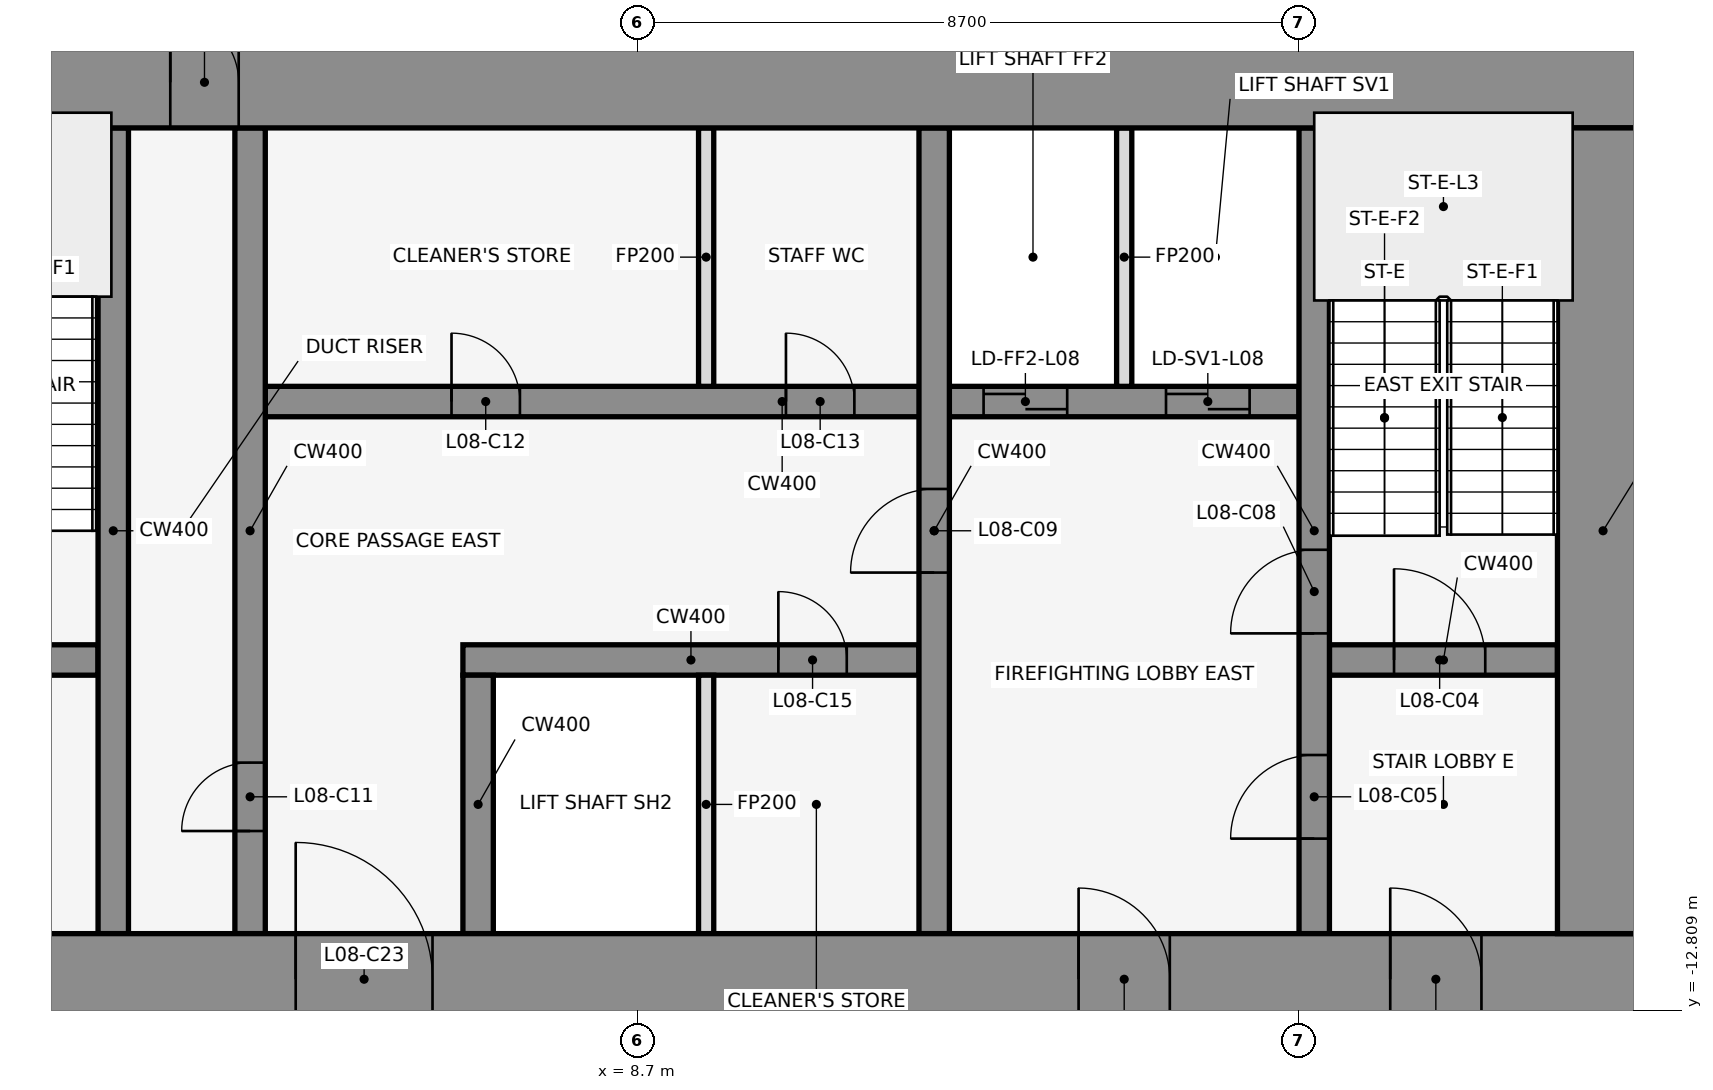
"""IFC4 building model, lengths in metres.
Left out: names, types, materials, properties, quantities, classifications, styles, units other than length and angle.
Written with IfcOpenShell. Run it as: python <this file> out.ifc"""

import sys

from ifc_helpers import new_model, si_unit, direction, frame, frame_2d, origin, place, context, subcontext, project, spatial, rectangle, extrude, element, fill, save


model = new_model("IFC4")
c1 = context("Model", 3, precision=1e-05, world=origin(), true_north=direction((0.0, 1.0)))
c2 = subcontext(c1, "Body", "Model", "MODEL_VIEW")
j1 = project(units=[si_unit("LENGTHUNIT", "METRE"), si_unit("PLANEANGLEUNIT", "RADIAN")], contexts=[c1])
p1 = place(None, origin())
s1 = spatial("IfcSite", under=j1, at=p1, CompositionType="ELEMENT")
p2 = place(p1, origin())
s2 = spatial("IfcBuilding", under=s1, at=p2, CompositionType="ELEMENT")
p3 = place(p2, frame((0.0, 0.0, 44.0)))
s3 = spatial("IfcBuildingStorey", under=s2, at=p3, CompositionType="ELEMENT", Elevation=44.0)
for number, where, z_axis, x_axis in (
    (1, (16.432, -0.105, 0.0), (0.0, 0.0, 1.0), (-0.84, 0.543, 0.0)),
    (2, (1.901, 1.08, 0.0), (0.0, 0.0, 1.0), (-0.84, -0.543, 0.0)),
):
    element("IfcWall", number, at=place(p3, frame(where, z_axis=z_axis, x_axis=x_axis)), inside=s3, PredefinedType="STANDARD", context=c2, shape_type="SweptSolid", body=[
        extrude(rectangle(XDim=2.183, YDim=0.25, at=frame_2d((1.091, 0.0))), origin(), (0.0, 0.0, 1.0), 4.35),
    ])
p4 = place(p3, frame((-1.6, -8.2, 0.0), z_axis=(0.0, 0.0, 1.0), x_axis=(1.0, 0.0, 0.0)))
e3 = element("IfcWall", 3, at=p4, inside=s3, PredefinedType="SHEAR", context=c2, shape_type="SweptSolid", body=[
    extrude(rectangle(XDim=3.2, YDim=0.4, at=frame_2d((1.6, 0.0))), origin(), (0.0, 0.0, 1.0), 4.5),
])
p5 = place(p4, frame((1.05, 0.0, 0.0)))
e4 = element("IfcOpeningElement", 4, at=p5, cuts=e3, PredefinedType="OPENING", context=c2, shape_type="SweptSolid", body=[
    extrude(rectangle(XDim=1.2, YDim=2.1, at=frame_2d((0.6, 1.05))), frame((0.0, 0.212, 0.0), z_axis=(0.0, -1.0, 0.0), x_axis=(1.0, 0.0, 0.0)), (0.0, 0.0, 1.0), 0.424),
])
p6 = place(p3, frame((6.4, -8.2, 0.0), z_axis=(0.0, 0.0, 1.0), x_axis=(1.0, 0.0, 0.0)))
e5 = element("IfcWall", 5, at=p6, inside=s3, PredefinedType="SHEAR", context=c2, shape_type="SweptSolid", body=[
    extrude(rectangle(XDim=6.0, YDim=0.4, at=frame_2d((3.0, 0.0))), origin(), (0.0, 0.0, 1.0), 4.5),
])
p7 = place(p6, frame((4.15, 0.0, 0.0)))
e6 = element("IfcOpeningElement", 6, at=p7, cuts=e5, PredefinedType="OPENING", context=c2, shape_type="SweptSolid", body=[
    extrude(rectangle(XDim=0.9, YDim=2.1, at=frame_2d((0.45, 1.05))), frame((0.0, 0.212, 0.0), z_axis=(0.0, -1.0, 0.0), x_axis=(1.0, 0.0, 0.0)), (0.0, 0.0, 1.0), 0.424),
])
p8 = place(p3, frame((17.8, -8.2, 0.0), z_axis=(0.0, 0.0, 1.0), x_axis=(1.0, 0.0, 0.0)))
e7 = element("IfcWall", 7, at=p8, inside=s3, PredefinedType="SHEAR", context=c2, shape_type="SweptSolid", body=[
    extrude(rectangle(XDim=3.0, YDim=0.4, at=frame_2d((1.5, 0.0))), origin(), (0.0, 0.0, 1.0), 4.5),
])
p9 = place(p8, frame((0.85, 0.0, 0.0)))
e8 = element("IfcOpeningElement", 8, at=p9, cuts=e7, PredefinedType="OPENING", context=c2, shape_type="SweptSolid", body=[
    extrude(rectangle(XDim=1.2, YDim=2.1, at=frame_2d((0.6, 1.05))), frame((0.0, 0.212, 0.0), z_axis=(0.0, -1.0, 0.0), x_axis=(1.0, 0.0, 0.0)), (0.0, 0.0, 1.0), 0.424),
])
p10 = place(p3, frame((3.8, -4.8, 0.0), z_axis=(0.0, 0.0, 1.0), x_axis=(1.0, 0.0, 0.0)))
e9 = element("IfcWall", 9, at=p10, inside=s3, PredefinedType="SHEAR", context=c2, shape_type="SweptSolid", body=[
    extrude(rectangle(XDim=13.6, YDim=0.4, at=frame_2d((6.8, 0.0))), origin(), (0.0, 0.0, 1.0), 4.5),
])
p11 = place(p10, frame((9.45, 0.0, 0.0)))
e10 = element("IfcOpeningElement", 10, at=p11, cuts=e9, PredefinedType="OPENING", context=c2, shape_type="SweptSolid", body=[
    extrude(rectangle(XDim=1.1, YDim=2.1, at=frame_2d((0.55, 1.05))), frame((0.0, 0.212, 0.0), z_axis=(0.0, -1.0, 0.0), x_axis=(1.0, 0.0, 0.0)), (0.0, 0.0, 1.0), 0.424),
])
p12 = place(p10, frame((11.85, 0.0, 0.0)))
e11 = element("IfcOpeningElement", 11, at=p12, cuts=e9, PredefinedType="OPENING", context=c2, shape_type="SweptSolid", body=[
    extrude(rectangle(XDim=1.1, YDim=2.1, at=frame_2d((0.55, 1.05))), frame((0.0, 0.212, 0.0), z_axis=(0.0, -1.0, 0.0), x_axis=(1.0, 0.0, 0.0)), (0.0, 0.0, 1.0), 0.424),
])
p13 = place(p10, frame((2.45, 0.0, 0.0)))
e12 = element("IfcOpeningElement", 12, at=p13, cuts=e9, PredefinedType="OPENING", context=c2, shape_type="SweptSolid", body=[
    extrude(rectangle(XDim=0.9, YDim=2.1, at=frame_2d((0.45, 1.05))), frame((0.0, 0.212, 0.0), z_axis=(0.0, -1.0, 0.0), x_axis=(1.0, 0.0, 0.0)), (0.0, 0.0, 1.0), 0.424),
])
p14 = place(p10, frame((6.85, 0.0, 0.0)))
e13 = element("IfcOpeningElement", 13, at=p14, cuts=e9, PredefinedType="OPENING", context=c2, shape_type="SweptSolid", body=[
    extrude(rectangle(XDim=0.9, YDim=2.1, at=frame_2d((0.45, 1.05))), frame((0.0, 0.212, 0.0), z_axis=(0.0, -1.0, 0.0), x_axis=(1.0, 0.0, 0.0)), (0.0, 0.0, 1.0), 0.424),
])
p15 = place(p3, frame((1.8, -11.8, 0.0), z_axis=(0.0, 0.0, 1.0), x_axis=(0.0, 1.0, 0.0)))
e14 = element("IfcWall", 14, at=p15, inside=s3, PredefinedType="SHEAR", context=c2, shape_type="SweptSolid", body=[
    extrude(rectangle(XDim=10.6, YDim=0.4, at=frame_2d((5.3, 0.0))), origin(), (0.0, 0.0, 1.0), 4.5),
])
p16 = place(p3, frame((3.6, -11.8, 0.0), z_axis=(0.0, 0.0, 1.0), x_axis=(0.0, 1.0, 0.0)))
e15 = element("IfcWall", 15, at=p16, inside=s3, PredefinedType="SHEAR", context=c2, shape_type="SweptSolid", body=[
    extrude(rectangle(XDim=10.6, YDim=0.4, at=frame_2d((5.3, 0.0))), origin(), (0.0, 0.0, 1.0), 4.5),
])
p17 = place(p16, frame((1.35, 0.0, 0.0)))
e16 = element("IfcOpeningElement", 16, at=p17, cuts=e15, PredefinedType="OPENING", context=c2, shape_type="SweptSolid", body=[
    extrude(rectangle(XDim=0.9, YDim=2.1, at=frame_2d((0.45, 1.05))), frame((0.0, 0.212, 0.0), z_axis=(0.0, -1.0, 0.0), x_axis=(1.0, 0.0, 0.0)), (0.0, 0.0, 1.0), 0.424),
])
p18 = place(p3, frame((6.6, -11.8, 0.0), z_axis=(0.0, 0.0, 1.0), x_axis=(0.0, 1.0, 0.0)))
e17 = element("IfcWall", 17, at=p18, inside=s3, PredefinedType="SHEAR", context=c2, shape_type="SweptSolid", body=[
    extrude(rectangle(XDim=3.4, YDim=0.4, at=frame_2d((1.7, 0.0))), origin(), (0.0, 0.0, 1.0), 4.5),
])
for number, where, z_axis, x_axis in (
    (18, (9.6, -11.8, 0.0), (0.0, 0.0, 1.0), (0.0, 1.0, 0.0)),
    (19, (9.6, -4.6, 0.0), (0.0, 0.0, 1.0), (0.0, 1.0, 0.0)),
):
    element("IfcWall", number, at=place(p3, frame(where, z_axis=z_axis, x_axis=x_axis)), inside=s3, PredefinedType="PARTITIONING", context=c2, shape_type="SweptSolid", body=[
        extrude(rectangle(XDim=3.4, YDim=0.2, at=frame_2d((1.7, 0.0))), origin(), (0.0, 0.0, 1.0), 3.418),
    ])
p19 = place(p3, frame((12.6, -11.8, 0.0), z_axis=(0.0, 0.0, 1.0), x_axis=(0.0, 1.0, 0.0)))
e20 = element("IfcWall", 20, at=p19, inside=s3, PredefinedType="SHEAR", context=c2, shape_type="SweptSolid", body=[
    extrude(rectangle(XDim=10.6, YDim=0.4, at=frame_2d((5.3, 0.0))), origin(), (0.0, 0.0, 1.0), 4.5),
])
p20 = place(p19, frame((4.75, 0.0, 0.0)))
e21 = element("IfcOpeningElement", 21, at=p20, cuts=e20, PredefinedType="OPENING", context=c2, shape_type="SweptSolid", body=[
    extrude(rectangle(XDim=1.1, YDim=2.1, at=frame_2d((0.55, 1.05))), frame((0.0, 0.212, 0.0), z_axis=(0.0, -1.0, 0.0), x_axis=(1.0, 0.0, 0.0)), (0.0, 0.0, 1.0), 0.424),
])
p21 = place(p3, frame((15.1, -4.6, 0.0), z_axis=(0.0, 0.0, 1.0), x_axis=(0.0, 1.0, 0.0)))
e22 = element("IfcWall", 22, at=p21, inside=s3, PredefinedType="PARTITIONING", context=c2, shape_type="SweptSolid", body=[
    extrude(rectangle(XDim=3.4, YDim=0.2, at=frame_2d((1.7, 0.0))), origin(), (0.0, 0.0, 1.0), 3.418),
])
p22 = place(p3, frame((17.6, -11.8, 0.0), z_axis=(0.0, 0.0, 1.0), x_axis=(0.0, 1.0, 0.0)))
e23 = element("IfcWall", 23, at=p22, inside=s3, PredefinedType="SHEAR", context=c2, shape_type="SweptSolid", body=[
    extrude(rectangle(XDim=10.6, YDim=0.4, at=frame_2d((5.3, 0.0))), origin(), (0.0, 0.0, 1.0), 4.5),
])
p23 = place(p22, frame((1.25, 0.0, 0.0)))
e24 = element("IfcOpeningElement", 24, at=p23, cuts=e23, PredefinedType="OPENING", context=c2, shape_type="SweptSolid", body=[
    extrude(rectangle(XDim=1.1, YDim=2.1, at=frame_2d((0.55, 1.05))), frame((0.0, 0.212, 0.0), z_axis=(0.0, -1.0, 0.0), x_axis=(1.0, 0.0, 0.0)), (0.0, 0.0, 1.0), 0.424),
])
p24 = place(p22, frame((3.95, 0.0, 0.0)))
e25 = element("IfcOpeningElement", 25, at=p24, cuts=e23, PredefinedType="OPENING", context=c2, shape_type="SweptSolid", body=[
    extrude(rectangle(XDim=1.1, YDim=2.1, at=frame_2d((0.55, 1.05))), frame((0.0, 0.212, 0.0), z_axis=(0.0, -1.0, 0.0), x_axis=(1.0, 0.0, 0.0)), (0.0, 0.0, 1.0), 0.424),
])
p25 = place(p3, frame((-22.0, -0.6, 0.0), z_axis=(0.0, 0.0, 1.0), x_axis=(1.0, 0.0, 0.0)))
e26 = element("IfcWall", 26, at=p25, inside=s3, PredefinedType="SHEAR", context=c2, shape_type="SweptSolid", body=[
    extrude(rectangle(XDim=44.0, YDim=1.2, at=frame_2d((22.0, 0.0))), origin(), (0.0, 0.0, 1.0), 4.5),
])
p26 = place(p25, frame((18.55, 0.0, 0.0)))
e27 = element("IfcOpeningElement", 27, at=p26, cuts=e26, PredefinedType="OPENING", context=c2, shape_type="SweptSolid", body=[
    extrude(rectangle(XDim=0.9, YDim=2.1, at=frame_2d((0.45, 1.05))), frame((0.0, 0.612, 0.0), z_axis=(0.0, -1.0, 0.0), x_axis=(1.0, 0.0, 0.0)), (0.0, 0.0, 1.0), 1.224),
])
p27 = place(p25, frame((24.55, 0.0, 0.0)))
e28 = element("IfcOpeningElement", 28, at=p27, cuts=e26, PredefinedType="OPENING", context=c2, shape_type="SweptSolid", body=[
    extrude(rectangle(XDim=0.9, YDim=2.1, at=frame_2d((0.45, 1.05))), frame((0.0, 0.612, 0.0), z_axis=(0.0, -1.0, 0.0), x_axis=(1.0, 0.0, 0.0)), (0.0, 0.0, 1.0), 1.224),
])
p28 = place(p3, frame((-22.0, -12.4, 0.0), z_axis=(0.0, 0.0, 1.0), x_axis=(1.0, 0.0, 0.0)))
e29 = element("IfcWall", 29, at=p28, inside=s3, PredefinedType="SHEAR", context=c2, shape_type="SweptSolid", body=[
    extrude(rectangle(XDim=44.0, YDim=1.2, at=frame_2d((22.0, 0.0))), origin(), (0.0, 0.0, 1.0), 4.5),
])
p29 = place(p28, frame((2.2, 0.0, 0.0)))
e30 = element("IfcOpeningElement", 30, at=p29, cuts=e29, PredefinedType="OPENING", context=c2, shape_type="SweptSolid", body=[
    extrude(rectangle(XDim=1.2, YDim=2.1, at=frame_2d((0.6, 1.05))), frame((0.0, 0.612, 0.0), z_axis=(0.0, -1.0, 0.0), x_axis=(1.0, 0.0, 0.0)), (0.0, 0.0, 1.0), 1.224),
])
p30 = place(p28, frame((21.4, 0.0, 0.0)))
e31 = element("IfcOpeningElement", 31, at=p30, cuts=e29, PredefinedType="OPENING", context=c2, shape_type="SweptSolid", body=[
    extrude(rectangle(XDim=1.2, YDim=2.1, at=frame_2d((0.6, 1.05))), frame((0.0, 0.612, 0.0), z_axis=(0.0, -1.0, 0.0), x_axis=(1.0, 0.0, 0.0)), (0.0, 0.0, 1.0), 1.224),
])
p31 = place(p28, frame((40.6, 0.0, 0.0)))
e32 = element("IfcOpeningElement", 32, at=p31, cuts=e29, PredefinedType="OPENING", context=c2, shape_type="SweptSolid", body=[
    extrude(rectangle(XDim=1.2, YDim=2.1, at=frame_2d((0.6, 1.05))), frame((0.0, 0.612, 0.0), z_axis=(0.0, -1.0, 0.0), x_axis=(1.0, 0.0, 0.0)), (0.0, 0.0, 1.0), 1.224),
])
p32 = place(p28, frame((16.0, 0.0, 0.0)))
e33 = element("IfcOpeningElement", 33, at=p32, cuts=e29, PredefinedType="OPENING", context=c2, shape_type="SweptSolid", body=[
    extrude(rectangle(XDim=1.8, YDim=2.1, at=frame_2d((0.9, 1.05))), frame((0.0, 0.612, 0.0), z_axis=(0.0, -1.0, 0.0), x_axis=(1.0, 0.0, 0.0)), (0.0, 0.0, 1.0), 1.224),
])
p33 = place(p28, frame((6.3, 0.0, 0.0)))
e34 = element("IfcOpeningElement", 34, at=p33, cuts=e29, PredefinedType="OPENING", context=c2, shape_type="SweptSolid", body=[
    extrude(rectangle(XDim=1.2, YDim=2.1, at=frame_2d((0.6, 1.05))), frame((0.0, 0.612, 0.0), z_axis=(0.0, -1.0, 0.0), x_axis=(1.0, 0.0, 0.0)), (0.0, 0.0, 1.0), 1.224),
])
p34 = place(p28, frame((26.2, 0.0, 0.0)))
e35 = element("IfcOpeningElement", 35, at=p34, cuts=e29, PredefinedType="OPENING", context=c2, shape_type="SweptSolid", body=[
    extrude(rectangle(XDim=1.8, YDim=2.1, at=frame_2d((0.9, 1.05))), frame((0.0, 0.612, 0.0), z_axis=(0.0, -1.0, 0.0), x_axis=(1.0, 0.0, 0.0)), (0.0, 0.0, 1.0), 1.224),
])
p35 = place(p28, frame((36.5, 0.0, 0.0)))
e36 = element("IfcOpeningElement", 36, at=p35, cuts=e29, PredefinedType="OPENING", context=c2, shape_type="SweptSolid", body=[
    extrude(rectangle(XDim=1.2, YDim=2.1, at=frame_2d((0.6, 1.05))), frame((0.0, 0.612, 0.0), z_axis=(0.0, -1.0, 0.0), x_axis=(1.0, 0.0, 0.0)), (0.0, 0.0, 1.0), 1.224),
])
p36 = place(p3, frame((21.4, -11.8, 0.0), z_axis=(0.0, 0.0, 1.0), x_axis=(0.0, 1.0, 0.0)))
e37 = element("IfcWall", 37, at=p36, inside=s3, PredefinedType="SHEAR", context=c2, shape_type="SweptSolid", body=[
    extrude(rectangle(XDim=10.6, YDim=1.2, at=frame_2d((5.3, 0.0))), origin(), (0.0, 0.0, 1.0), 4.5),
])
p37 = place(p9, origin())
e38 = element("IfcDoor", 38, at=p37, inside=s3, OperationType="SINGLE_SWING_RIGHT", PredefinedType="DOOR", context=c2, shape_type="SweptSolid", body=[
    extrude(rectangle(XDim=1.2, YDim=2.1, at=frame_2d((0.6, 1.05))), frame((0.0, 0.025, 0.0), z_axis=(0.0, -1.0, 0.0), x_axis=(1.0, 0.0, 0.0)), (0.0, 0.0, 1.0), 0.05),
])
fill(e8, e38)
p38 = place(p23, origin())
e39 = element("IfcDoor", 39, at=p38, inside=s3, OperationType="SINGLE_SWING_LEFT", PredefinedType="DOOR", context=c2, shape_type="SweptSolid", body=[
    extrude(rectangle(XDim=1.1, YDim=2.1, at=frame_2d((0.55, 1.05))), frame((0.0, 0.025, 0.0), z_axis=(0.0, -1.0, 0.0), x_axis=(1.0, 0.0, 0.0)), (0.0, 0.0, 1.0), 0.05),
])
fill(e24, e39)
p39 = place(p11, origin())
e40 = element("IfcDoor", 40, at=p39, inside=s3, OperationType="DOUBLE_DOOR_SLIDING", PredefinedType="DOOR", context=c2, shape_type="SweptSolid", body=[
    extrude(rectangle(XDim=1.1, YDim=2.1, at=frame_2d((0.55, 1.05))), frame((0.0, 0.025, 0.0), z_axis=(0.0, -1.0, 0.0), x_axis=(1.0, 0.0, 0.0)), (0.0, 0.0, 1.0), 0.05),
])
fill(e10, e40)
p40 = place(p12, origin())
e41 = element("IfcDoor", 41, at=p40, inside=s3, OperationType="DOUBLE_DOOR_SLIDING", PredefinedType="DOOR", context=c2, shape_type="SweptSolid", body=[
    extrude(rectangle(XDim=1.1, YDim=2.1, at=frame_2d((0.55, 1.05))), frame((0.0, 0.025, 0.0), z_axis=(0.0, -1.0, 0.0), x_axis=(1.0, 0.0, 0.0)), (0.0, 0.0, 1.0), 0.05),
])
fill(e11, e41)
p41 = place(p24, origin())
e42 = element("IfcDoor", 42, at=p41, inside=s3, OperationType="SINGLE_SWING_RIGHT", PredefinedType="DOOR", context=c2, shape_type="SweptSolid", body=[
    extrude(rectangle(XDim=1.1, YDim=2.1, at=frame_2d((0.55, 1.05))), frame((0.0, 0.025, 0.0), z_axis=(0.0, -1.0, 0.0), x_axis=(1.0, 0.0, 0.0)), (0.0, 0.0, 1.0), 0.05),
])
fill(e25, e42)
p42 = place(p20, frame((1.1, 0.0, 0.0), z_axis=(0.0, 0.0, 1.0), x_axis=(-1.0, 0.0, 0.0)))
e43 = element("IfcDoor", 43, at=p42, inside=s3, OperationType="SINGLE_SWING_RIGHT", PredefinedType="DOOR", context=c2, shape_type="SweptSolid", body=[
    extrude(rectangle(XDim=1.1, YDim=2.1, at=frame_2d((0.55, 1.05))), frame((0.0, 0.025, 0.0), z_axis=(0.0, -1.0, 0.0), x_axis=(1.0, 0.0, 0.0)), (0.0, 0.0, 1.0), 0.05),
])
fill(e21, e43)
p43 = place(p17, origin())
e44 = element("IfcDoor", 44, at=p43, inside=s3, OperationType="SINGLE_SWING_LEFT", PredefinedType="DOOR", context=c2, shape_type="SweptSolid", body=[
    extrude(rectangle(XDim=0.9, YDim=2.1, at=frame_2d((0.45, 1.05))), frame((0.0, 0.025, 0.0), z_axis=(0.0, -1.0, 0.0), x_axis=(1.0, 0.0, 0.0)), (0.0, 0.0, 1.0), 0.05),
])
fill(e16, e44)
p44 = place(p13, origin())
e45 = element("IfcDoor", 45, at=p44, inside=s3, OperationType="SINGLE_SWING_RIGHT", PredefinedType="DOOR", context=c2, shape_type="SweptSolid", body=[
    extrude(rectangle(XDim=0.9, YDim=2.1, at=frame_2d((0.45, 1.05))), frame((0.0, 0.025, 0.0), z_axis=(0.0, -1.0, 0.0), x_axis=(1.0, 0.0, 0.0)), (0.0, 0.0, 1.0), 0.05),
])
fill(e12, e45)
p45 = place(p14, origin())
e46 = element("IfcDoor", 46, at=p45, inside=s3, OperationType="SINGLE_SWING_LEFT", PredefinedType="DOOR", context=c2, shape_type="SweptSolid", body=[
    extrude(rectangle(XDim=0.9, YDim=2.1, at=frame_2d((0.45, 1.05))), frame((0.0, 0.025, 0.0), z_axis=(0.0, -1.0, 0.0), x_axis=(1.0, 0.0, 0.0)), (0.0, 0.0, 1.0), 0.05),
])
fill(e13, e46)
p46 = place(p7, frame((0.9, 0.0, 0.0), z_axis=(0.0, 0.0, 1.0), x_axis=(-1.0, 0.0, 0.0)))
e47 = element("IfcDoor", 47, at=p46, inside=s3, OperationType="SINGLE_SWING_RIGHT", PredefinedType="DOOR", context=c2, shape_type="SweptSolid", body=[
    extrude(rectangle(XDim=0.9, YDim=2.1, at=frame_2d((0.45, 1.05))), frame((0.0, 0.025, 0.0), z_axis=(0.0, -1.0, 0.0), x_axis=(1.0, 0.0, 0.0)), (0.0, 0.0, 1.0), 0.05),
])
fill(e6, e47)
p47 = place(p27, origin())
e48 = element("IfcDoor", 48, at=p47, inside=s3, OperationType="SINGLE_SWING_LEFT", PredefinedType="DOOR", context=c2, shape_type="SweptSolid", body=[
    extrude(rectangle(XDim=0.9, YDim=2.1, at=frame_2d((0.45, 1.05))), frame((0.0, 0.025, 0.0), z_axis=(0.0, -1.0, 0.0), x_axis=(1.0, 0.0, 0.0)), (0.0, 0.0, 1.0), 0.05),
])
fill(e28, e48)
p48 = place(p31, frame((1.2, 0.0, 0.0), z_axis=(0.0, 0.0, 1.0), x_axis=(-1.0, 0.0, 0.0)))
e49 = element("IfcDoor", 49, at=p48, inside=s3, OperationType="SINGLE_SWING_RIGHT", PredefinedType="DOOR", context=c2, shape_type="SweptSolid", body=[
    extrude(rectangle(XDim=1.2, YDim=2.1, at=frame_2d((0.6, 1.05))), frame((0.0, 0.025, 0.0), z_axis=(0.0, -1.0, 0.0), x_axis=(1.0, 0.0, 0.0)), (0.0, 0.0, 1.0), 0.05),
])
fill(e32, e49)
p49 = place(p34, origin())
e50 = element("IfcDoor", 50, at=p49, inside=s3, OperationType="SINGLE_SWING_LEFT", PredefinedType="DOOR", context=c2, shape_type="SweptSolid", body=[
    extrude(rectangle(XDim=1.8, YDim=2.1, at=frame_2d((0.9, 1.05))), frame((0.0, 0.025, 0.0), z_axis=(0.0, -1.0, 0.0), x_axis=(1.0, 0.0, 0.0)), (0.0, 0.0, 1.0), 0.05),
])
fill(e35, e50)
p50 = place(p35, frame((1.2, 0.0, 0.0), z_axis=(0.0, 0.0, 1.0), x_axis=(-1.0, 0.0, 0.0)))
e51 = element("IfcDoor", 51, at=p50, inside=s3, OperationType="SINGLE_SWING_RIGHT", PredefinedType="DOOR", context=c2, shape_type="SweptSolid", body=[
    extrude(rectangle(XDim=1.2, YDim=2.1, at=frame_2d((0.6, 1.05))), frame((0.0, 0.025, 0.0), z_axis=(0.0, -1.0, 0.0), x_axis=(1.0, 0.0, 0.0)), (0.0, 0.0, 1.0), 0.05),
])
fill(e36, e51)
save(model, sys.argv[1])
